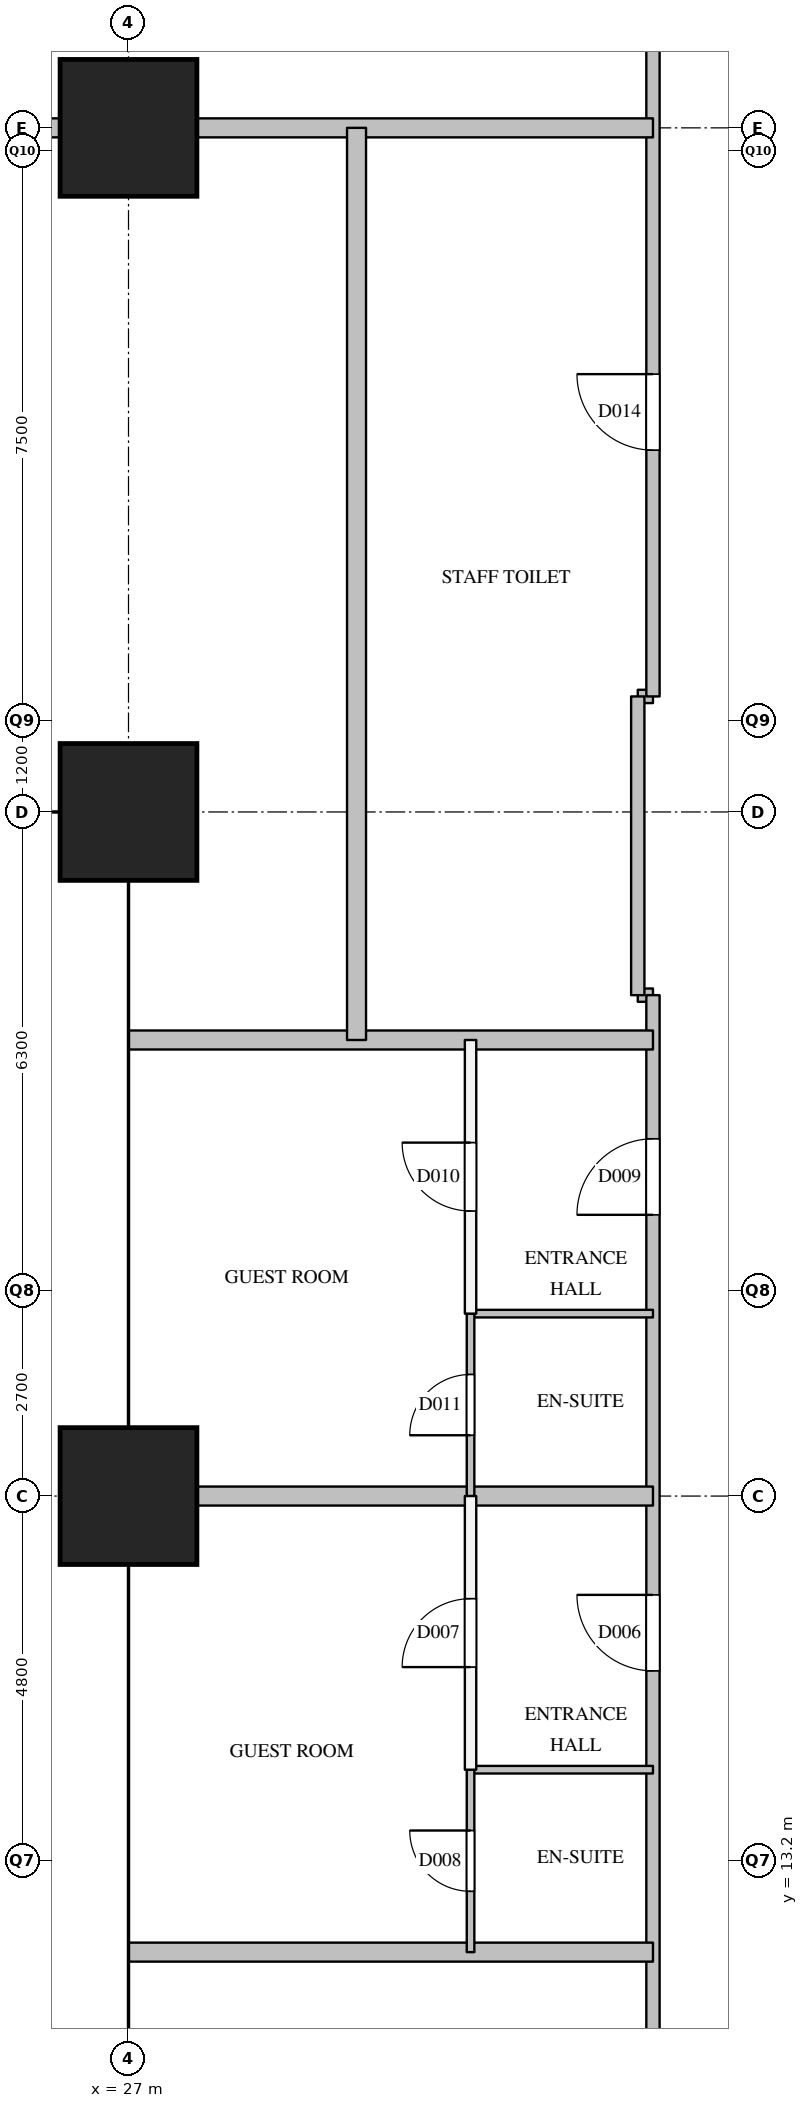
"""IFC4 building model, lengths in metres.
Left out: names, types, materials, properties, quantities, classifications, styles, units other than length and angle.
Written with IfcOpenShell. Run it as: python <this file> out.ifc"""

import sys

from ifc_helpers import new_model, si_unit, direction, frame, frame_2d, origin, origin_2d, place, context, subcontext, project, spatial, rectangle, extrude, element, fill, save


model = new_model("IFC4")
c1 = context("Model", 3, precision=1e-05, world=origin(), true_north=direction((0.0, 1.0)))
c2 = subcontext(c1, "Body", "Model", "MODEL_VIEW")
j1 = project(units=[si_unit("LENGTHUNIT", "METRE"), si_unit("PLANEANGLEUNIT", "RADIAN")], contexts=[c1])
p1 = place(None, origin())
s1 = spatial("IfcSite", under=j1, at=p1, CompositionType="ELEMENT")
p2 = place(p1, origin())
s2 = spatial("IfcBuilding", under=s1, at=p2, CompositionType="ELEMENT")
p3 = place(p2, frame((0.0, 0.0, 93.0)))
s3 = spatial("IfcBuildingStorey", under=s2, at=p3, CompositionType="ELEMENT", Elevation=93.0)
for number, where, z_axis, x_axis in (
    (1, (27.0, 18.0, 0.0), (0.0, 0.0, 1.0), (1.0, 0.0, 0.0)),
    (2, (27.0, 27.0, 0.0), (0.0, 0.0, 1.0), (1.0, 0.0, 0.0)),
    (3, (27.0, 36.0, 0.0), (0.0, 0.0, 1.0), (1.0, 0.0, 0.0)),
):
    element("IfcColumn", number, at=place(p3, frame(where, z_axis=z_axis, x_axis=x_axis)), inside=s3, PredefinedType="COLUMN", context=c2, shape_type="SweptSolid", body=[
        extrude(rectangle(XDim=1.8, YDim=1.8, at=origin_2d()), origin(), (0.0, 0.0, 1.0), 3.8),
    ])
for number, where, z_axis, x_axis in (
    (4, (33.7, 24.59, 0.0), (0.0, 0.0, 1.0), (1.0, 0.0, 0.0)),
    (5, (33.7, 28.52, 0.0), (0.0, 0.0, 1.0), (1.0, 0.0, 0.0)),
):
    element("IfcWall", number, at=place(p3, frame(where, z_axis=z_axis, x_axis=x_axis)), inside=s3, PredefinedType="PARTITIONING", context=c2, shape_type="SweptSolid", body=[
        extrude(rectangle(XDim=0.2, YDim=0.175, at=frame_2d((0.1, 0.0))), origin(), (0.0, 0.0, 1.0), 3.5),
    ])
p4 = place(p3, frame((33.7, 24.59, 0.0), z_axis=(0.0, 0.0, 1.0), x_axis=(0.0, 1.0, 0.0)))
e6 = element("IfcWall", 6, at=p4, inside=s3, PredefinedType="PARTITIONING", context=c2, shape_type="SweptSolid", body=[
    extrude(rectangle(XDim=3.93, YDim=0.175, at=frame_2d((1.965, 0.0))), origin(), (0.0, 0.0, 1.0), 2.5),
])
p5 = place(p3, frame((33.9, 6.9, 0.0), z_axis=(0.0, 0.0, 1.0), x_axis=(0.0, 1.0, 0.0)))
e7 = element("IfcWall", 7, at=p5, inside=s3, PredefinedType="PARTITIONING", context=c2, shape_type="SweptSolid", body=[
    extrude(rectangle(XDim=17.69, YDim=0.175, at=frame_2d((8.845, 0.0))), origin(), (0.0, 0.0, 1.0), 3.5),
])
p6 = place(p5, frame((2.1, 0.0, 0.0)))
e8 = element("IfcOpeningElement", 8, at=p6, cuts=e7, PredefinedType="OPENING", context=c2, shape_type="SweptSolid", body=[
    extrude(rectangle(XDim=0.9, YDim=2.1, at=frame_2d((0.45, 1.05))), frame((0.0, 0.097, 0.0), z_axis=(0.0, -1.0, 0.0), x_axis=(1.0, 0.0, 0.0)), (0.0, 0.0, 1.0), 0.195),
])
p7 = place(p5, frame((8.8, 0.0, 0.0)))
e9 = element("IfcOpeningElement", 9, at=p7, cuts=e7, PredefinedType="OPENING", context=c2, shape_type="SweptSolid", body=[
    extrude(rectangle(XDim=1.0, YDim=2.1, at=frame_2d((0.5, 1.05))), frame((0.0, 0.097, 0.0), z_axis=(0.0, -1.0, 0.0), x_axis=(1.0, 0.0, 0.0)), (0.0, 0.0, 1.0), 0.195),
])
p8 = place(p5, frame((14.8, 0.0, 0.0)))
e10 = element("IfcOpeningElement", 10, at=p8, cuts=e7, PredefinedType="OPENING", context=c2, shape_type="SweptSolid", body=[
    extrude(rectangle(XDim=1.0, YDim=2.1, at=frame_2d((0.5, 1.05))), frame((0.0, 0.097, 0.0), z_axis=(0.0, -1.0, 0.0), x_axis=(1.0, 0.0, 0.0)), (0.0, 0.0, 1.0), 0.195),
])
p9 = place(p3, frame((33.9, 28.52, 0.0), z_axis=(0.0, 0.0, 1.0), x_axis=(0.0, 1.0, 0.0)))
e11 = element("IfcWall", 11, at=p9, inside=s3, PredefinedType="PARTITIONING", context=c2, shape_type="SweptSolid", body=[
    extrude(rectangle(XDim=23.58, YDim=0.175, at=frame_2d((11.79, 0.0))), origin(), (0.0, 0.0, 1.0), 3.5),
])
p10 = place(p9, frame((3.24, 0.0, 0.0)))
e12 = element("IfcOpeningElement", 12, at=p10, cuts=e11, PredefinedType="OPENING", context=c2, shape_type="SweptSolid", body=[
    extrude(rectangle(XDim=1.0, YDim=2.1, at=frame_2d((0.5, 1.05))), frame((0.0, 0.097, 0.0), z_axis=(0.0, -1.0, 0.0), x_axis=(1.0, 0.0, 0.0)), (0.0, 0.0, 1.0), 0.195),
])
p11 = place(p9, frame((9.98, 0.0, 0.0)))
e13 = element("IfcOpeningElement", 13, at=p11, cuts=e11, PredefinedType="OPENING", context=c2, shape_type="SweptSolid", body=[
    extrude(rectangle(XDim=1.0, YDim=2.1, at=frame_2d((0.5, 1.05))), frame((0.0, 0.097, 0.0), z_axis=(0.0, -1.0, 0.0), x_axis=(1.0, 0.0, 0.0)), (0.0, 0.0, 1.0), 0.195),
])
p12 = place(p9, frame((18.08, 0.0, 0.0)))
e14 = element("IfcOpeningElement", 14, at=p12, cuts=e11, PredefinedType="OPENING", context=c2, shape_type="SweptSolid", body=[
    extrude(rectangle(XDim=0.9, YDim=2.1, at=frame_2d((0.45, 1.05))), frame((0.0, 0.097, 0.0), z_axis=(0.0, -1.0, 0.0), x_axis=(1.0, 0.0, 0.0)), (0.0, 0.0, 1.0), 0.195),
])
p13 = place(p3, frame((31.5, 14.4, 0.0), z_axis=(0.0, 0.0, 1.0), x_axis=(0.0, 1.0, 0.0)))
e15 = element("IfcWall", 15, at=p13, inside=s3, PredefinedType="PARTITIONING", context=c2, shape_type="SweptSolid", body=[
    extrude(rectangle(XDim=3.6, YDim=0.15, at=frame_2d((1.8, 0.0))), origin(), (0.0, 0.0, 1.0), 3.5),
])
p14 = place(p13, frame((1.35, 0.0, 0.0)))
e16 = element("IfcOpeningElement", 16, at=p14, cuts=e15, PredefinedType="OPENING", context=c2, shape_type="SweptSolid", body=[
    extrude(rectangle(XDim=0.9, YDim=2.1, at=frame_2d((0.45, 1.05))), frame((0.0, 0.085, 0.0), z_axis=(0.0, -1.0, 0.0), x_axis=(1.0, 0.0, 0.0)), (0.0, 0.0, 1.0), 0.17),
])
p15 = place(p3, frame((31.5, 20.4, 0.0), z_axis=(0.0, 0.0, 1.0), x_axis=(0.0, 1.0, 0.0)))
e17 = element("IfcWall", 17, at=p15, inside=s3, PredefinedType="PARTITIONING", context=c2, shape_type="SweptSolid", body=[
    extrude(rectangle(XDim=3.6, YDim=0.15, at=frame_2d((1.8, 0.0))), origin(), (0.0, 0.0, 1.0), 3.5),
])
p16 = place(p15, frame((1.35, 0.0, 0.0)))
e18 = element("IfcOpeningElement", 18, at=p16, cuts=e17, PredefinedType="OPENING", context=c2, shape_type="SweptSolid", body=[
    extrude(rectangle(XDim=0.9, YDim=2.1, at=frame_2d((0.45, 1.05))), frame((0.0, 0.085, 0.0), z_axis=(0.0, -1.0, 0.0), x_axis=(1.0, 0.0, 0.0)), (0.0, 0.0, 1.0), 0.17),
])
p17 = place(p3, frame((27.0, 12.0, 0.0), z_axis=(0.0, 0.0, 1.0), x_axis=(1.0, 0.0, 0.0)))
e19 = element("IfcWall", 19, at=p17, inside=s3, PredefinedType="PARTITIONING", context=c2, shape_type="SweptSolid", body=[
    extrude(rectangle(XDim=6.9, YDim=0.25, at=frame_2d((3.45, 0.0))), origin(), (0.0, 0.0, 1.0), 2.5),
])
p18 = place(p3, frame((27.0, 18.0, 0.0), z_axis=(0.0, 0.0, 1.0), x_axis=(1.0, 0.0, 0.0)))
e20 = element("IfcWall", 20, at=p18, inside=s3, PredefinedType="PARTITIONING", context=c2, shape_type="SweptSolid", body=[
    extrude(rectangle(XDim=6.9, YDim=0.25, at=frame_2d((3.45, 0.0))), origin(), (0.0, 0.0, 1.0), 3.5),
])
p19 = place(p3, frame((27.0, 24.0, 0.0), z_axis=(0.0, 0.0, 1.0), x_axis=(1.0, 0.0, 0.0)))
e21 = element("IfcWall", 21, at=p19, inside=s3, PredefinedType="PARTITIONING", context=c2, shape_type="SweptSolid", body=[
    extrude(rectangle(XDim=6.9, YDim=0.25, at=frame_2d((3.45, 0.0))), origin(), (0.0, 0.0, 1.0), 2.5),
])
p20 = place(p3, frame((20.1, 36.0, 0.0), z_axis=(0.0, 0.0, 1.0), x_axis=(1.0, 0.0, 0.0)))
e22 = element("IfcWall", 22, at=p20, inside=s3, PredefinedType="PARTITIONING", context=c2, shape_type="SweptSolid", body=[
    extrude(rectangle(XDim=13.8, YDim=0.25, at=frame_2d((6.9, 0.0))), origin(), (0.0, 0.0, 1.0), 3.5),
])
p21 = place(p3, frame((30.0, 24.0, 0.0), z_axis=(0.0, 0.0, 1.0), x_axis=(0.0, 1.0, 0.0)))
e23 = element("IfcWall", 23, at=p21, inside=s3, PredefinedType="PARTITIONING", context=c2, shape_type="SweptSolid", body=[
    extrude(rectangle(XDim=12.0, YDim=0.25, at=frame_2d((6.0, 0.0))), origin(), (0.0, 0.0, 1.0), 2.5),
])
for number, where, z_axis, x_axis in (
    (24, (31.5, 14.4, 0.0), (0.0, 0.0, 1.0), (1.0, 0.0, 0.0)),
    (25, (31.5, 20.4, 0.0), (0.0, 0.0, 1.0), (1.0, 0.0, 0.0)),
):
    element("IfcWall", number, at=place(p3, frame(where, z_axis=z_axis, x_axis=x_axis)), inside=s3, PredefinedType="PARTITIONING", context=c2, shape_type="SweptSolid", body=[
        extrude(rectangle(XDim=2.4, YDim=0.1, at=frame_2d((1.2, 0.0))), origin(), (0.0, 0.0, 1.0), 3.5),
    ])
p22 = place(p3, frame((31.5, 12.0, 0.0), z_axis=(0.0, 0.0, 1.0), x_axis=(0.0, 1.0, 0.0)))
e26 = element("IfcWall", 26, at=p22, inside=s3, PredefinedType="PARTITIONING", context=c2, shape_type="SweptSolid", body=[
    extrude(rectangle(XDim=2.4, YDim=0.1, at=frame_2d((1.2, 0.0))), origin(), (0.0, 0.0, 1.0), 3.5),
])
p23 = place(p22, frame((0.8, 0.0, 0.0)))
e27 = element("IfcOpeningElement", 27, at=p23, cuts=e26, PredefinedType="OPENING", context=c2, shape_type="SweptSolid", body=[
    extrude(rectangle(XDim=0.8, YDim=2.1, at=frame_2d((0.4, 1.05))), frame((0.0, 0.06, 0.0), z_axis=(0.0, -1.0, 0.0), x_axis=(1.0, 0.0, 0.0)), (0.0, 0.0, 1.0), 0.12),
])
p24 = place(p3, frame((31.5, 18.0, 0.0), z_axis=(0.0, 0.0, 1.0), x_axis=(0.0, 1.0, 0.0)))
e28 = element("IfcWall", 28, at=p24, inside=s3, PredefinedType="PARTITIONING", context=c2, shape_type="SweptSolid", body=[
    extrude(rectangle(XDim=2.4, YDim=0.1, at=frame_2d((1.2, 0.0))), origin(), (0.0, 0.0, 1.0), 3.5),
])
p25 = place(p24, frame((0.8, 0.0, 0.0)))
e29 = element("IfcOpeningElement", 29, at=p25, cuts=e28, PredefinedType="OPENING", context=c2, shape_type="SweptSolid", body=[
    extrude(rectangle(XDim=0.8, YDim=2.1, at=frame_2d((0.4, 1.05))), frame((0.0, 0.06, 0.0), z_axis=(0.0, -1.0, 0.0), x_axis=(1.0, 0.0, 0.0)), (0.0, 0.0, 1.0), 0.12),
])
p26 = place(p7, origin())
e30 = element("IfcDoor", 30, at=p26, inside=s3, OperationType="SINGLE_SWING_RIGHT", PredefinedType="DOOR", context=c2, shape_type="SweptSolid", body=[
    extrude(rectangle(XDim=1.0, YDim=2.1, at=frame_2d((0.5, 1.05))), frame((0.0, 0.025, 0.0), z_axis=(0.0, -1.0, 0.0), x_axis=(1.0, 0.0, 0.0)), (0.0, 0.0, 1.0), 0.05),
])
fill(e9, e30)
p27 = place(p14, origin())
e31 = element("IfcDoor", 31, at=p27, inside=s3, OperationType="SINGLE_SWING_LEFT", PredefinedType="DOOR", context=c2, shape_type="SweptSolid", body=[
    extrude(rectangle(XDim=0.9, YDim=2.1, at=frame_2d((0.45, 1.05))), frame((0.0, 0.025, 0.0), z_axis=(0.0, -1.0, 0.0), x_axis=(1.0, 0.0, 0.0)), (0.0, 0.0, 1.0), 0.05),
])
fill(e16, e31)
p28 = place(p23, origin())
e32 = element("IfcDoor", 32, at=p28, inside=s3, OperationType="SINGLE_SWING_RIGHT", PredefinedType="DOOR", context=c2, shape_type="SweptSolid", body=[
    extrude(rectangle(XDim=0.8, YDim=2.1, at=frame_2d((0.4, 1.05))), frame((0.0, 0.025, 0.0), z_axis=(0.0, -1.0, 0.0), x_axis=(1.0, 0.0, 0.0)), (0.0, 0.0, 1.0), 0.05),
])
fill(e27, e32)
p29 = place(p8, origin())
e33 = element("IfcDoor", 33, at=p29, inside=s3, OperationType="SINGLE_SWING_LEFT", PredefinedType="DOOR", context=c2, shape_type="SweptSolid", body=[
    extrude(rectangle(XDim=1.0, YDim=2.1, at=frame_2d((0.5, 1.05))), frame((0.0, 0.025, 0.0), z_axis=(0.0, -1.0, 0.0), x_axis=(1.0, 0.0, 0.0)), (0.0, 0.0, 1.0), 0.05),
])
fill(e10, e33)
p30 = place(p16, origin())
e34 = element("IfcDoor", 34, at=p30, inside=s3, OperationType="SINGLE_SWING_RIGHT", PredefinedType="DOOR", context=c2, shape_type="SweptSolid", body=[
    extrude(rectangle(XDim=0.9, YDim=2.1, at=frame_2d((0.45, 1.05))), frame((0.0, 0.025, 0.0), z_axis=(0.0, -1.0, 0.0), x_axis=(1.0, 0.0, 0.0)), (0.0, 0.0, 1.0), 0.05),
])
fill(e18, e34)
p31 = place(p25, origin())
e35 = element("IfcDoor", 35, at=p31, inside=s3, OperationType="SINGLE_SWING_LEFT", PredefinedType="DOOR", context=c2, shape_type="SweptSolid", body=[
    extrude(rectangle(XDim=0.8, YDim=2.1, at=frame_2d((0.4, 1.05))), frame((0.0, 0.025, 0.0), z_axis=(0.0, -1.0, 0.0), x_axis=(1.0, 0.0, 0.0)), (0.0, 0.0, 1.0), 0.05),
])
fill(e29, e35)
p32 = place(p10, origin())
e36 = element("IfcDoor", 36, at=p32, inside=s3, OperationType="SINGLE_SWING_RIGHT", PredefinedType="DOOR", context=c2, shape_type="SweptSolid", body=[
    extrude(rectangle(XDim=1.0, YDim=2.1, at=frame_2d((0.5, 1.05))), frame((0.0, 0.025, 0.0), z_axis=(0.0, -1.0, 0.0), x_axis=(1.0, 0.0, 0.0)), (0.0, 0.0, 1.0), 0.05),
])
fill(e12, e36)
save(model, sys.argv[1])
